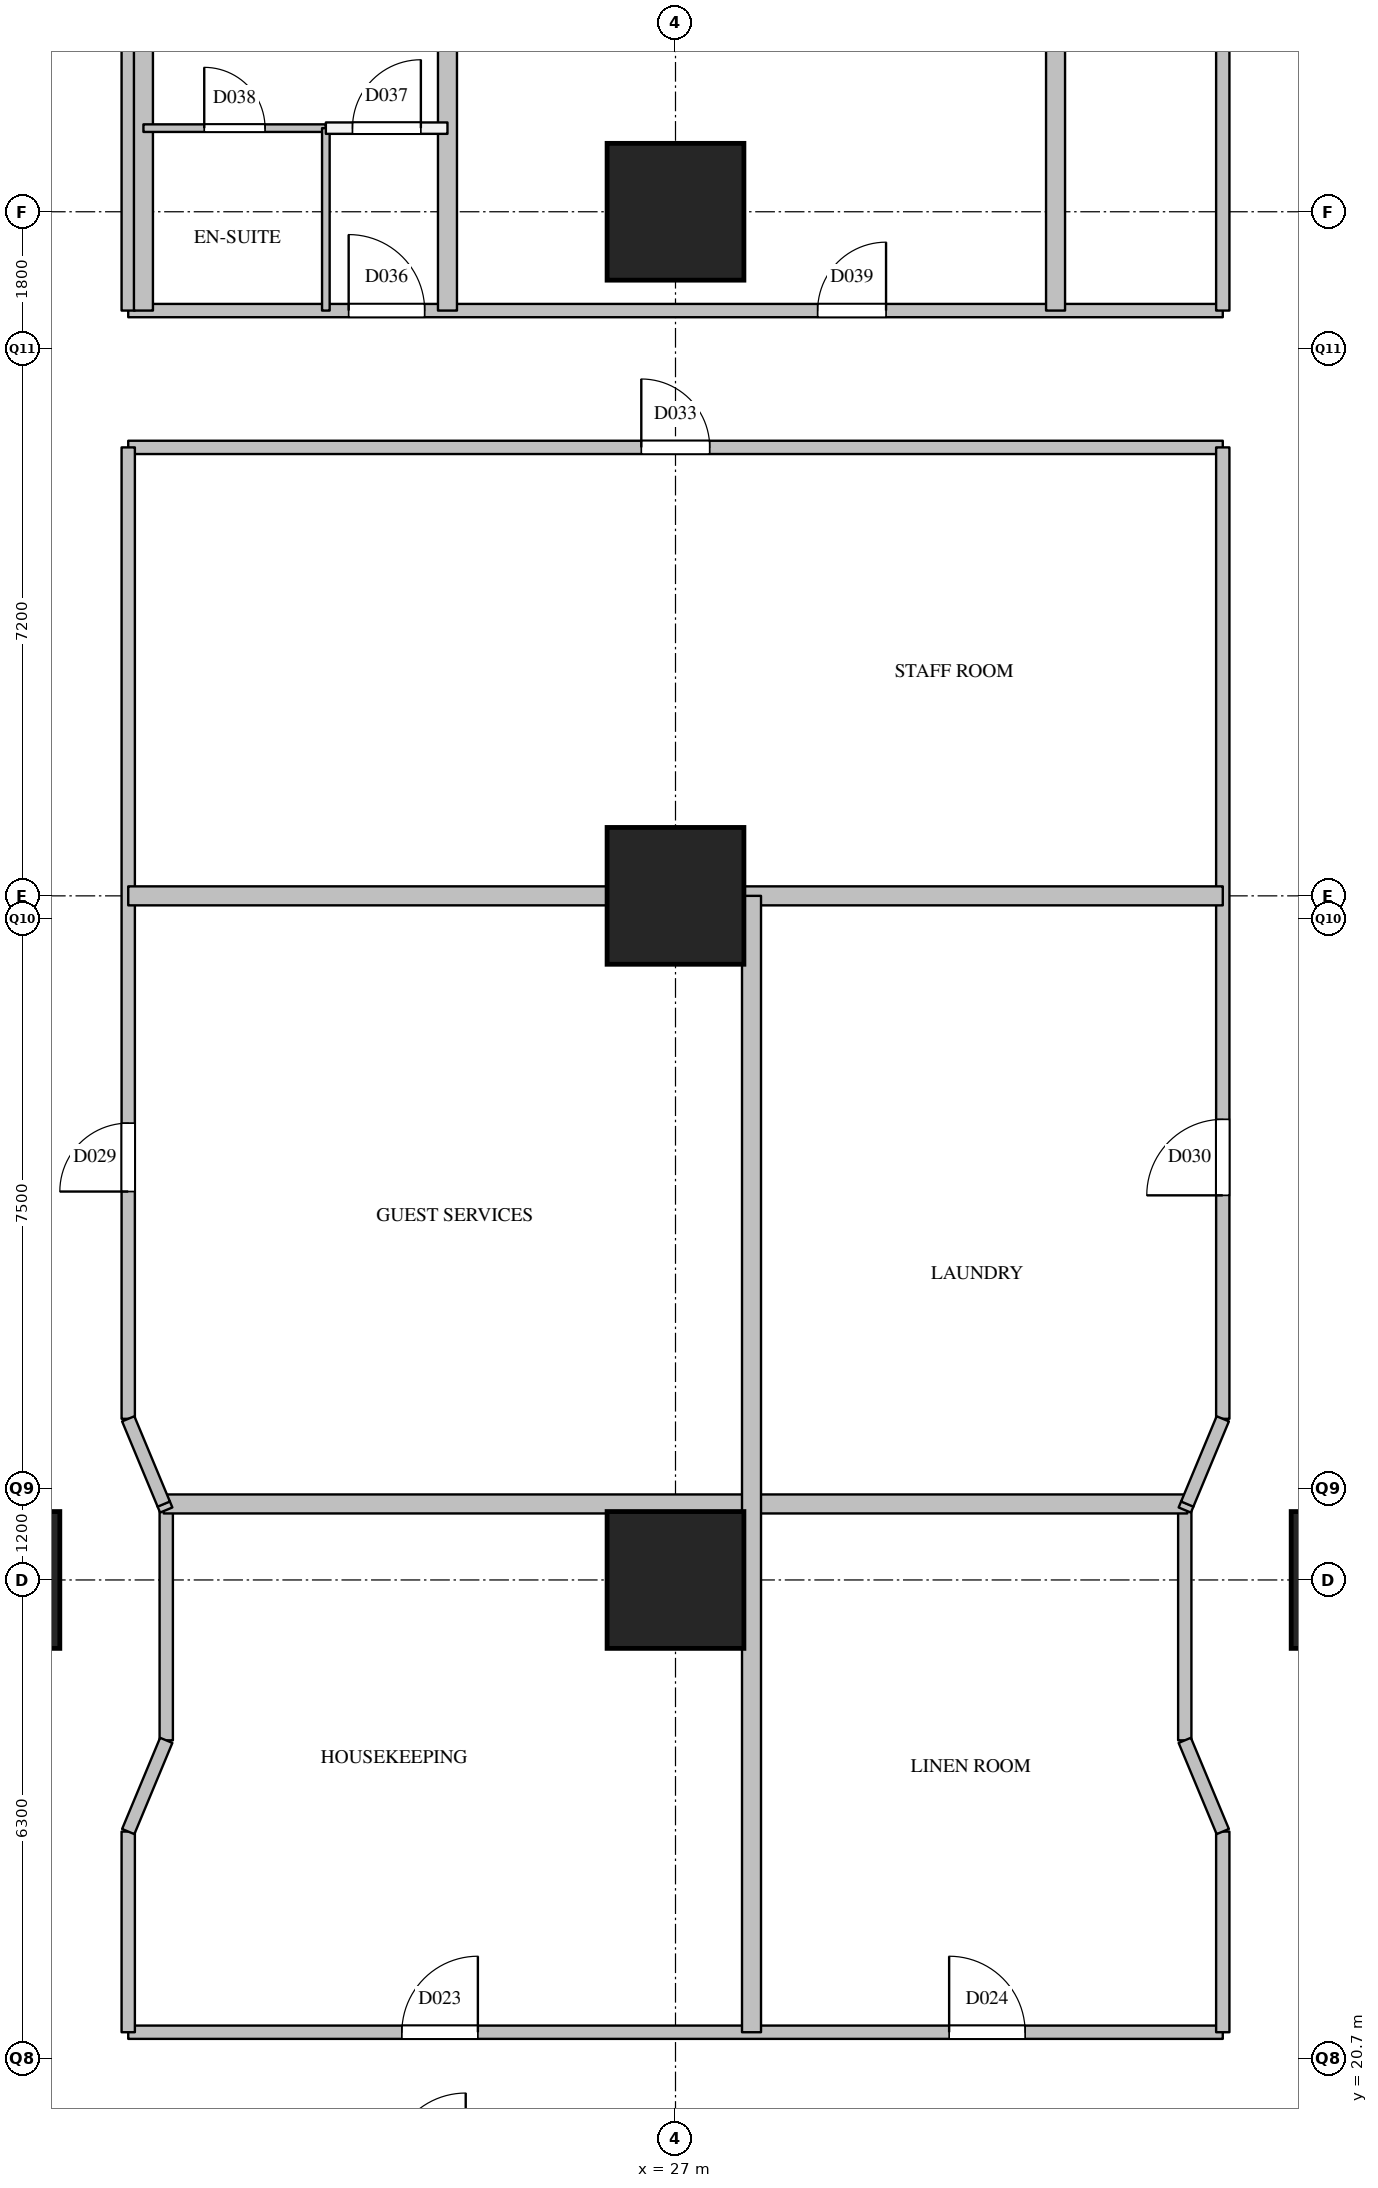
"""IFC4 building model, lengths in metres.
Left out: names, types, materials, properties, quantities, classifications, styles, units other than length and angle.
Written with IfcOpenShell. Run it as: python <this file> out.ifc"""

import sys

from ifc_helpers import new_model, si_unit, direction, frame, frame_2d, origin, origin_2d, place, context, subcontext, project, spatial, rectangle, extrude, element, fill, save


model = new_model("IFC4")
c1 = context("Model", 3, precision=1e-05, world=origin(), true_north=direction((0.0, 1.0)))
c2 = subcontext(c1, "Body", "Model", "MODEL_VIEW")
j1 = project(units=[si_unit("LENGTHUNIT", "METRE"), si_unit("PLANEANGLEUNIT", "RADIAN")], contexts=[c1])
p1 = place(None, origin())
s1 = spatial("IfcSite", under=j1, at=p1, CompositionType="ELEMENT")
p2 = place(p1, origin())
s2 = spatial("IfcBuilding", under=s1, at=p2, CompositionType="ELEMENT")
p3 = place(p2, frame((0.0, 0.0, 34.8)))
s3 = spatial("IfcBuildingStorey", under=s2, at=p3, CompositionType="ELEMENT", Elevation=34.8)
for number, where, z_axis, x_axis in (
    (1, (18.0, 27.0, 0.0), (0.0, 0.0, 1.0), (1.0, 0.0, 0.0)),
    (2, (27.0, 27.0, 0.0), (0.0, 0.0, 1.0), (1.0, 0.0, 0.0)),
    (3, (27.0, 36.0, 0.0), (0.0, 0.0, 1.0), (1.0, 0.0, 0.0)),
    (4, (27.0, 45.0, 0.0), (0.0, 0.0, 1.0), (1.0, 0.0, 0.0)),
    (5, (36.0, 27.0, 0.0), (0.0, 0.0, 1.0), (1.0, 0.0, 0.0)),
):
    element("IfcColumn", number, at=place(p3, frame(where, z_axis=z_axis, x_axis=x_axis)), inside=s3, PredefinedType="COLUMN", context=c2, shape_type="SweptSolid", body=[
        extrude(rectangle(XDim=1.8, YDim=1.8, at=origin_2d()), origin(), (0.0, 0.0, 1.0), 3.8),
    ])
p4 = place(p3, frame((19.8, 21.05, 0.0), z_axis=(0.0, 0.0, 1.0), x_axis=(1.0, 0.0, 0.0)))
e6 = element("IfcWall", 6, at=p4, inside=s3, PredefinedType="PARTITIONING", context=c2, shape_type="SweptSolid", body=[
    extrude(rectangle(XDim=14.4, YDim=0.175, at=frame_2d((7.2, 0.0))), origin(), (0.0, 0.0, 1.0), 2.5),
])
p5 = place(p4, frame((3.6, 0.0, 0.0)))
e7 = element("IfcOpeningElement", 7, at=p5, cuts=e6, PredefinedType="OPENING", context=c2, shape_type="SweptSolid", body=[
    extrude(rectangle(XDim=1.0, YDim=2.1, at=frame_2d((0.5, 1.05))), frame((0.0, 0.097, 0.0), z_axis=(0.0, -1.0, 0.0), x_axis=(1.0, 0.0, 0.0)), (0.0, 0.0, 1.0), 0.195),
])
p6 = place(p4, frame((10.8, 0.0, 0.0)))
e8 = element("IfcOpeningElement", 8, at=p6, cuts=e6, PredefinedType="OPENING", context=c2, shape_type="SweptSolid", body=[
    extrude(rectangle(XDim=1.0, YDim=2.1, at=frame_2d((0.5, 1.05))), frame((0.0, 0.097, 0.0), z_axis=(0.0, -1.0, 0.0), x_axis=(1.0, 0.0, 0.0)), (0.0, 0.0, 1.0), 0.195),
])
p7 = place(p3, frame((19.8, 41.9, 0.0), z_axis=(0.0, 0.0, 1.0), x_axis=(1.0, 0.0, 0.0)))
e9 = element("IfcWall", 9, at=p7, inside=s3, PredefinedType="PARTITIONING", context=c2, shape_type="SweptSolid", body=[
    extrude(rectangle(XDim=14.4, YDim=0.175, at=frame_2d((7.2, 0.0))), origin(), (0.0, 0.0, 1.0), 2.5),
])
p8 = place(p7, frame((6.75, 0.0, 0.0)))
e10 = element("IfcOpeningElement", 10, at=p8, cuts=e9, PredefinedType="OPENING", context=c2, shape_type="SweptSolid", body=[
    extrude(rectangle(XDim=0.9, YDim=2.1, at=frame_2d((0.45, 1.05))), frame((0.0, 0.097, 0.0), z_axis=(0.0, -1.0, 0.0), x_axis=(1.0, 0.0, 0.0)), (0.0, 0.0, 1.0), 0.195),
])
p9 = place(p3, frame((19.8, 43.7, 0.0), z_axis=(0.0, 0.0, 1.0), x_axis=(1.0, 0.0, 0.0)))
e11 = element("IfcWall", 11, at=p9, inside=s3, PredefinedType="PARTITIONING", context=c2, shape_type="SweptSolid", body=[
    extrude(rectangle(XDim=14.4, YDim=0.175, at=frame_2d((7.2, 0.0))), origin(), (0.0, 0.0, 1.0), 2.5),
])
p10 = place(p9, frame((2.9, 0.0, 0.0)))
e12 = element("IfcOpeningElement", 12, at=p10, cuts=e11, PredefinedType="OPENING", context=c2, shape_type="SweptSolid", body=[
    extrude(rectangle(XDim=1.0, YDim=2.1, at=frame_2d((0.5, 1.05))), frame((0.0, 0.097, 0.0), z_axis=(0.0, -1.0, 0.0), x_axis=(1.0, 0.0, 0.0)), (0.0, 0.0, 1.0), 0.195),
])
p11 = place(p9, frame((9.07, 0.0, 0.0)))
e13 = element("IfcOpeningElement", 13, at=p11, cuts=e11, PredefinedType="OPENING", context=c2, shape_type="SweptSolid", body=[
    extrude(rectangle(XDim=0.9, YDim=2.1, at=frame_2d((0.45, 1.05))), frame((0.0, 0.097, 0.0), z_axis=(0.0, -1.0, 0.0), x_axis=(1.0, 0.0, 0.0)), (0.0, 0.0, 1.0), 0.195),
])
p12 = place(p3, frame((19.8, 21.05, 0.0), z_axis=(0.0, 0.0, 1.0), x_axis=(0.0, 1.0, 0.0)))
e14 = element("IfcWall", 14, at=p12, inside=s3, PredefinedType="PARTITIONING", context=c2, shape_type="SweptSolid", body=[
    extrude(rectangle(XDim=2.64, YDim=0.175, at=frame_2d((1.32, 0.0))), origin(), (0.0, 0.0, 1.0), 3.5),
])
p13 = place(p3, frame((19.8, 29.12, 0.0), z_axis=(0.0, 0.0, 1.0), x_axis=(0.0, 1.0, 0.0)))
e15 = element("IfcWall", 15, at=p13, inside=s3, PredefinedType="PARTITIONING", context=c2, shape_type="SweptSolid", body=[
    extrude(rectangle(XDim=12.78, YDim=0.175, at=frame_2d((6.39, 0.0))), origin(), (0.0, 0.0, 1.0), 3.5),
])
p14 = place(p13, frame((2.99, 0.0, 0.0)))
e16 = element("IfcOpeningElement", 16, at=p14, cuts=e15, PredefinedType="OPENING", context=c2, shape_type="SweptSolid", body=[
    extrude(rectangle(XDim=0.9, YDim=2.1, at=frame_2d((0.45, 1.05))), frame((0.0, 0.097, 0.0), z_axis=(0.0, -1.0, 0.0), x_axis=(1.0, 0.0, 0.0)), (0.0, 0.0, 1.0), 0.195),
])
p15 = place(p3, frame((19.8, 43.7, 0.0), z_axis=(0.0, 0.0, 1.0), x_axis=(0.0, 1.0, 0.0)))
e17 = element("IfcWall", 17, at=p15, inside=s3, PredefinedType="PARTITIONING", context=c2, shape_type="SweptSolid", body=[
    extrude(rectangle(XDim=8.1, YDim=0.175, at=frame_2d((4.05, 0.0))), origin(), (0.0, 0.0, 1.0), 3.5),
])
for number, where, z_axis, x_axis in (
    (18, (20.3, 24.89, 0.0), (0.0, 0.0, 1.0), (0.0, 1.0, 0.0)),
    (19, (33.7, 24.89, 0.0), (0.0, 0.0, 1.0), (0.0, 1.0, 0.0)),
):
    element("IfcWall", number, at=place(p3, frame(where, z_axis=z_axis, x_axis=x_axis)), inside=s3, PredefinedType="PARTITIONING", context=c2, shape_type="SweptSolid", body=[
        extrude(rectangle(XDim=3.03, YDim=0.175, at=frame_2d((1.515, 0.0))), origin(), (0.0, 0.0, 1.0), 2.5),
    ])
p16 = place(p3, frame((34.2, 21.05, 0.0), z_axis=(0.0, 0.0, 1.0), x_axis=(0.0, 1.0, 0.0)))
e20 = element("IfcWall", 20, at=p16, inside=s3, PredefinedType="PARTITIONING", context=c2, shape_type="SweptSolid", body=[
    extrude(rectangle(XDim=2.64, YDim=0.175, at=frame_2d((1.32, 0.0))), origin(), (0.0, 0.0, 1.0), 3.5),
])
p17 = place(p3, frame((34.2, 29.12, 0.0), z_axis=(0.0, 0.0, 1.0), x_axis=(0.0, 1.0, 0.0)))
e21 = element("IfcWall", 21, at=p17, inside=s3, PredefinedType="PARTITIONING", context=c2, shape_type="SweptSolid", body=[
    extrude(rectangle(XDim=12.78, YDim=0.175, at=frame_2d((6.39, 0.0))), origin(), (0.0, 0.0, 1.0), 3.5),
])
p18 = place(p17, frame((2.94, 0.0, 0.0)))
e22 = element("IfcOpeningElement", 22, at=p18, cuts=e21, PredefinedType="OPENING", context=c2, shape_type="SweptSolid", body=[
    extrude(rectangle(XDim=1.0, YDim=2.1, at=frame_2d((0.5, 1.05))), frame((0.0, 0.097, 0.0), z_axis=(0.0, -1.0, 0.0), x_axis=(1.0, 0.0, 0.0)), (0.0, 0.0, 1.0), 0.195),
])
p19 = place(p3, frame((34.2, 43.7, 0.0), z_axis=(0.0, 0.0, 1.0), x_axis=(0.0, 1.0, 0.0)))
e23 = element("IfcWall", 23, at=p19, inside=s3, PredefinedType="PARTITIONING", context=c2, shape_type="SweptSolid", body=[
    extrude(rectangle(XDim=8.1, YDim=0.175, at=frame_2d((4.05, 0.0))), origin(), (0.0, 0.0, 1.0), 3.5),
])
p20 = place(p19, frame((3.6, 0.0, 0.0)))
e24 = element("IfcOpeningElement", 24, at=p20, cuts=e23, PredefinedType="OPENING", context=c2, shape_type="SweptSolid", body=[
    extrude(rectangle(XDim=0.9, YDim=2.1, at=frame_2d((0.45, 1.05))), frame((0.0, 0.097, 0.0), z_axis=(0.0, -1.0, 0.0), x_axis=(1.0, 0.0, 0.0)), (0.0, 0.0, 1.0), 0.195),
])
p21 = place(p3, frame((22.4, 46.1, 0.0), z_axis=(0.0, 0.0, 1.0), x_axis=(1.0, 0.0, 0.0)))
e25 = element("IfcWall", 25, at=p21, inside=s3, PredefinedType="PARTITIONING", context=c2, shape_type="SweptSolid", body=[
    extrude(rectangle(XDim=1.6, YDim=0.15, at=frame_2d((0.8, 0.0))), origin(), (0.0, 0.0, 1.0), 3.5),
])
p22 = place(p21, frame((0.35, 0.0, 0.0)))
e26 = element("IfcOpeningElement", 26, at=p22, cuts=e25, PredefinedType="OPENING", context=c2, shape_type="SweptSolid", body=[
    extrude(rectangle(XDim=0.9, YDim=2.1, at=frame_2d((0.45, 1.05))), frame((0.0, 0.085, 0.0), z_axis=(0.0, -1.0, 0.0), x_axis=(1.0, 0.0, 0.0)), (0.0, 0.0, 1.0), 0.17),
])
p23 = place(p3, frame((20.267, 28.0, 0.0), z_axis=(0.0, 0.0, 1.0), x_axis=(1.0, 0.0, 0.0)))
e27 = element("IfcWall", 27, at=p23, inside=s3, PredefinedType="PARTITIONING", context=c2, shape_type="SweptSolid", body=[
    extrude(rectangle(XDim=13.467, YDim=0.25, at=frame_2d((6.733, 0.0))), origin(), (0.0, 0.0, 1.0), 2.5),
])
p24 = place(p3, frame((19.8, 36.0, 0.0), z_axis=(0.0, 0.0, 1.0), x_axis=(1.0, 0.0, 0.0)))
e28 = element("IfcWall", 28, at=p24, inside=s3, PredefinedType="PARTITIONING", context=c2, shape_type="SweptSolid", body=[
    extrude(rectangle(XDim=14.4, YDim=0.25, at=frame_2d((7.2, 0.0))), origin(), (0.0, 0.0, 1.0), 3.5),
])
for number, where, z_axis, x_axis in (
    (29, (20.0, 43.7, 0.0), (0.0, 0.0, 1.0), (0.0, 1.0, 0.0)),
    (30, (24.0, 43.7, 0.0), (0.0, 0.0, 1.0), (0.0, 1.0, 0.0)),
):
    element("IfcWall", number, at=place(p3, frame(where, z_axis=z_axis, x_axis=x_axis)), inside=s3, PredefinedType="PARTITIONING", context=c2, shape_type="SweptSolid", body=[
        extrude(rectangle(XDim=10.3, YDim=0.25, at=frame_2d((5.15, 0.0))), origin(), (0.0, 0.0, 1.0), 2.5),
    ])
p25 = place(p3, frame((28.0, 21.05, 0.0), z_axis=(0.0, 0.0, 1.0), x_axis=(0.0, 1.0, 0.0)))
e31 = element("IfcWall", 31, at=p25, inside=s3, PredefinedType="PARTITIONING", context=c2, shape_type="SweptSolid", body=[
    extrude(rectangle(XDim=14.95, YDim=0.25, at=frame_2d((7.475, 0.0))), origin(), (0.0, 0.0, 1.0), 2.5),
])
p26 = place(p3, frame((32.0, 43.7, 0.0), z_axis=(0.0, 0.0, 1.0), x_axis=(0.0, 1.0, 0.0)))
e32 = element("IfcWall", 32, at=p26, inside=s3, PredefinedType="PARTITIONING", context=c2, shape_type="SweptSolid", body=[
    extrude(rectangle(XDim=10.3, YDim=0.25, at=frame_2d((5.15, 0.0))), origin(), (0.0, 0.0, 1.0), 2.5),
])
p27 = place(p3, frame((20.0, 46.1, 0.0), z_axis=(0.0, 0.0, 1.0), x_axis=(1.0, 0.0, 0.0)))
e33 = element("IfcWall", 33, at=p27, inside=s3, PredefinedType="PARTITIONING", context=c2, shape_type="SweptSolid", body=[
    extrude(rectangle(XDim=2.4, YDim=0.1, at=frame_2d((1.2, 0.0))), origin(), (0.0, 0.0, 1.0), 3.5),
])
p28 = place(p27, frame((0.8, 0.0, 0.0)))
e34 = element("IfcOpeningElement", 34, at=p28, cuts=e33, PredefinedType="OPENING", context=c2, shape_type="SweptSolid", body=[
    extrude(rectangle(XDim=0.8, YDim=2.1, at=frame_2d((0.4, 1.05))), frame((0.0, 0.06, 0.0), z_axis=(0.0, -1.0, 0.0), x_axis=(1.0, 0.0, 0.0)), (0.0, 0.0, 1.0), 0.12),
])
p29 = place(p3, frame((22.4, 43.7, 0.0), z_axis=(0.0, 0.0, 1.0), x_axis=(0.0, 1.0, 0.0)))
e35 = element("IfcWall", 35, at=p29, inside=s3, PredefinedType="PARTITIONING", context=c2, shape_type="SweptSolid", body=[
    extrude(rectangle(XDim=2.4, YDim=0.1, at=frame_2d((1.2, 0.0))), origin(), (0.0, 0.0, 1.0), 3.5),
])
p30 = place(p3, frame((20.266, 28.002, 0.0), z_axis=(0.0, 0.0, 1.0), x_axis=(0.38559300399, -0.922668973833, 0.0)))
e36 = element("IfcWall", 36, at=p30, inside=s3, PredefinedType="PARTITIONING", context=c2, shape_type="SweptSolid", body=[
    extrude(rectangle(XDim=0.089, YDim=0.175, at=frame_2d((0.044, 0.0))), origin(), (0.0, 0.0, 1.0), 3.5),
])
for number, where, z_axis, x_axis in (
    (37, (20.3, 24.89, 0.0), (0.0, 0.0, 1.0), (-0.385, -0.923, 0.0)),
    (38, (34.2, 23.69, 0.0), (0.0, 0.0, 1.0), (-0.385, 0.923, 0.0)),
):
    element("IfcWall", number, at=place(p3, frame(where, z_axis=z_axis, x_axis=x_axis)), inside=s3, PredefinedType="PARTITIONING", context=c2, shape_type="SweptSolid", body=[
        extrude(rectangle(XDim=1.3, YDim=0.175, at=frame_2d((0.65, 0.0))), origin(), (0.0, 0.0, 1.0), 3.5),
    ])
p31 = place(p3, frame((33.7, 27.92, 0.0), z_axis=(0.0, 0.0, 1.0), x_axis=(0.38559300399, 0.922668973833, 0.0)))
e39 = element("IfcWall", 39, at=p31, inside=s3, PredefinedType="PARTITIONING", context=c2, shape_type="SweptSolid", body=[
    extrude(rectangle(XDim=0.089, YDim=0.175, at=frame_2d((0.044, 0.0))), origin(), (0.0, 0.0, 1.0), 3.5),
])
for number, where, z_axis, x_axis in (
    (40, (19.8, 29.12, 0.0), (0.0, 0.0, 1.0), (0.385, -0.923, 0.0)),
    (41, (33.732, 27.998, 0.0), (0.0, 0.0, 1.0), (0.385, 0.923, 0.0)),
):
    element("IfcWall", number, at=place(p3, frame(where, z_axis=z_axis, x_axis=x_axis)), inside=s3, PredefinedType="PARTITIONING", context=c2, shape_type="SweptSolid", body=[
        extrude(rectangle(XDim=1.216, YDim=0.175, at=frame_2d((0.608, 0.0))), origin(), (0.0, 0.0, 1.0), 3.5),
    ])
p32 = place(p5, origin())
e42 = element("IfcDoor", 42, at=p32, inside=s3, OperationType="SINGLE_SWING_RIGHT", PredefinedType="DOOR", context=c2, shape_type="SweptSolid", body=[
    extrude(rectangle(XDim=1.0, YDim=2.1, at=frame_2d((0.5, 1.05))), frame((0.0, 0.025, 0.0), z_axis=(0.0, -1.0, 0.0), x_axis=(1.0, 0.0, 0.0)), (0.0, 0.0, 1.0), 0.05),
])
fill(e7, e42)
p33 = place(p6, origin())
e43 = element("IfcDoor", 43, at=p33, inside=s3, OperationType="SINGLE_SWING_LEFT", PredefinedType="DOOR", context=c2, shape_type="SweptSolid", body=[
    extrude(rectangle(XDim=1.0, YDim=2.1, at=frame_2d((0.5, 1.05))), frame((0.0, 0.025, 0.0), z_axis=(0.0, -1.0, 0.0), x_axis=(1.0, 0.0, 0.0)), (0.0, 0.0, 1.0), 0.05),
])
fill(e8, e43)
p34 = place(p14, origin())
e44 = element("IfcDoor", 44, at=p34, inside=s3, OperationType="SINGLE_SWING_LEFT", PredefinedType="DOOR", context=c2, shape_type="SweptSolid", body=[
    extrude(rectangle(XDim=0.9, YDim=2.1, at=frame_2d((0.45, 1.05))), frame((0.0, 0.025, 0.0), z_axis=(0.0, -1.0, 0.0), x_axis=(1.0, 0.0, 0.0)), (0.0, 0.0, 1.0), 0.05),
])
fill(e16, e44)
p35 = place(p18, origin())
e45 = element("IfcDoor", 45, at=p35, inside=s3, OperationType="SINGLE_SWING_LEFT", PredefinedType="DOOR", context=c2, shape_type="SweptSolid", body=[
    extrude(rectangle(XDim=1.0, YDim=2.1, at=frame_2d((0.5, 1.05))), frame((0.0, 0.025, 0.0), z_axis=(0.0, -1.0, 0.0), x_axis=(1.0, 0.0, 0.0)), (0.0, 0.0, 1.0), 0.05),
])
fill(e22, e45)
p36 = place(p8, origin())
e46 = element("IfcDoor", 46, at=p36, inside=s3, OperationType="SINGLE_SWING_LEFT", PredefinedType="DOOR", context=c2, shape_type="SweptSolid", body=[
    extrude(rectangle(XDim=0.9, YDim=2.1, at=frame_2d((0.45, 1.05))), frame((0.0, 0.025, 0.0), z_axis=(0.0, -1.0, 0.0), x_axis=(1.0, 0.0, 0.0)), (0.0, 0.0, 1.0), 0.05),
])
fill(e10, e46)
p37 = place(p10, origin())
e47 = element("IfcDoor", 47, at=p37, inside=s3, OperationType="SINGLE_SWING_LEFT", PredefinedType="DOOR", context=c2, shape_type="SweptSolid", body=[
    extrude(rectangle(XDim=1.0, YDim=2.1, at=frame_2d((0.5, 1.05))), frame((0.0, 0.025, 0.0), z_axis=(0.0, -1.0, 0.0), x_axis=(1.0, 0.0, 0.0)), (0.0, 0.0, 1.0), 0.05),
])
fill(e12, e47)
p38 = place(p22, origin())
e48 = element("IfcDoor", 48, at=p38, inside=s3, OperationType="SINGLE_SWING_RIGHT", PredefinedType="DOOR", context=c2, shape_type="SweptSolid", body=[
    extrude(rectangle(XDim=0.9, YDim=2.1, at=frame_2d((0.45, 1.05))), frame((0.0, 0.025, 0.0), z_axis=(0.0, -1.0, 0.0), x_axis=(1.0, 0.0, 0.0)), (0.0, 0.0, 1.0), 0.05),
])
fill(e26, e48)
p39 = place(p28, origin())
e49 = element("IfcDoor", 49, at=p39, inside=s3, OperationType="SINGLE_SWING_LEFT", PredefinedType="DOOR", context=c2, shape_type="SweptSolid", body=[
    extrude(rectangle(XDim=0.8, YDim=2.1, at=frame_2d((0.4, 1.05))), frame((0.0, 0.025, 0.0), z_axis=(0.0, -1.0, 0.0), x_axis=(1.0, 0.0, 0.0)), (0.0, 0.0, 1.0), 0.05),
])
fill(e34, e49)
p40 = place(p11, origin())
e50 = element("IfcDoor", 50, at=p40, inside=s3, OperationType="SINGLE_SWING_RIGHT", PredefinedType="DOOR", context=c2, shape_type="SweptSolid", body=[
    extrude(rectangle(XDim=0.9, YDim=2.1, at=frame_2d((0.45, 1.05))), frame((0.0, 0.025, 0.0), z_axis=(0.0, -1.0, 0.0), x_axis=(1.0, 0.0, 0.0)), (0.0, 0.0, 1.0), 0.05),
])
fill(e13, e50)
save(model, sys.argv[1])
